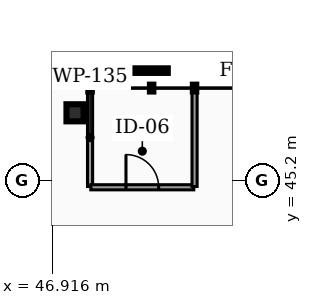
"""IFC4 building model, lengths in metres.
Left out: names, types, materials, properties, quantities, classifications, styles, units other than length and angle.
Written with IfcOpenShell. Run it as: python <this file> out.ifc"""

import sys

from ifc_helpers import new_model, si_unit, direction, frame, frame_2d, origin, origin_2d, place, context, subcontext, project, spatial, rectangle, hollow_rectangle, extrude, element, fill, save


model = new_model("IFC4")
c1 = context("Model", 3, precision=1e-05, world=origin(), true_north=direction((0.0, 1.0)))
c2 = subcontext(c1, "Body", "Model", "MODEL_VIEW")
j1 = project(units=[si_unit("LENGTHUNIT", "METRE"), si_unit("PLANEANGLEUNIT", "RADIAN")], contexts=[c1])
p1 = place(None, origin())
s1 = spatial("IfcSite", under=j1, at=p1, CompositionType="ELEMENT")
p2 = place(p1, origin())
s2 = spatial("IfcBuilding", under=s1, at=p2, CompositionType="ELEMENT")
p3 = place(p2, frame((0.0, 0.0, 278.8)))
s3 = spatial("IfcBuildingStorey", under=s2, at=p3, CompositionType="ELEMENT", Elevation=278.8)
p4 = place(p3, frame((47.517, 46.983, 0.0), z_axis=(0.0, 0.0, 1.0), x_axis=(1.0, 0.0, 0.0)))
e1 = element("IfcColumn", 1, at=p4, inside=s3, PredefinedType="COLUMN", context=c2, shape_type="SweptSolid", body=[
    extrude(hollow_rectangle(XDim=0.45, YDim=0.45, WallThickness=0.022, at=origin_2d()), origin(), (0.0, 0.0, 1.0), 3.18),
])
p5 = place(p3, frame((47.913, 45.043, 0.0), z_axis=(0.0, 0.0, 1.0), x_axis=(0.0, 1.0, 0.0)))
e2 = element("IfcWall", 2, at=p5, inside=s3, PredefinedType="PARTITIONING", context=c2, shape_type="SweptSolid", body=[
    extrude(rectangle(XDim=2.575, YDim=0.135, at=frame_2d((1.288, 0.0))), origin(), (0.0, 0.0, 1.0), 2.235),
])
p6 = place(p3, frame((47.933, 45.023, 0.0), z_axis=(0.0, 0.0, 1.0), x_axis=(1.0, 0.0, 0.0)))
e3 = element("IfcWall", 3, at=p6, inside=s3, PredefinedType="PARTITIONING", context=c2, shape_type="SweptSolid", body=[
    extrude(rectangle(XDim=2.71, YDim=0.135, at=frame_2d((1.355, 0.0))), origin(), (0.0, 0.0, 1.0), 2.235),
])
p7 = place(p6, frame((0.925, 0.0, 0.0)))
e4 = element("IfcOpeningElement", 4, at=p7, cuts=e3, PredefinedType="OPENING", context=c2, shape_type="SweptSolid", body=[
    extrude(rectangle(XDim=0.86, YDim=2.05, at=frame_2d((0.43, 1.025))), frame((0.0, 0.077, 0.0), z_axis=(0.0, -1.0, 0.0), x_axis=(1.0, 0.0, 0.0)), (0.0, 0.0, 1.0), 0.155),
])
p8 = place(p3, frame((50.663, 45.043, 0.0), z_axis=(0.0, 0.0, 1.0), x_axis=(0.0, 1.0, 0.0)))
e5 = element("IfcWall", 5, at=p8, inside=s3, PredefinedType="PARTITIONING", context=c2, shape_type="SweptSolid", body=[
    extrude(rectangle(XDim=2.575, YDim=0.135, at=frame_2d((1.288, 0.0))), origin(), (0.0, 0.0, 1.0), 2.235),
])
p9 = place(p7, origin())
e6 = element("IfcDoor", 6, at=p9, inside=s3, OperationType="SINGLE_SWING_LEFT", PredefinedType="DOOR", context=c2, shape_type="SweptSolid", body=[
    extrude(rectangle(XDim=0.86, YDim=2.05, at=frame_2d((0.43, 1.025))), frame((0.0, 0.025, 0.0), z_axis=(0.0, -1.0, 0.0), x_axis=(1.0, 0.0, 0.0)), (0.0, 0.0, 1.0), 0.05),
])
fill(e4, e6)
save(model, sys.argv[1])
